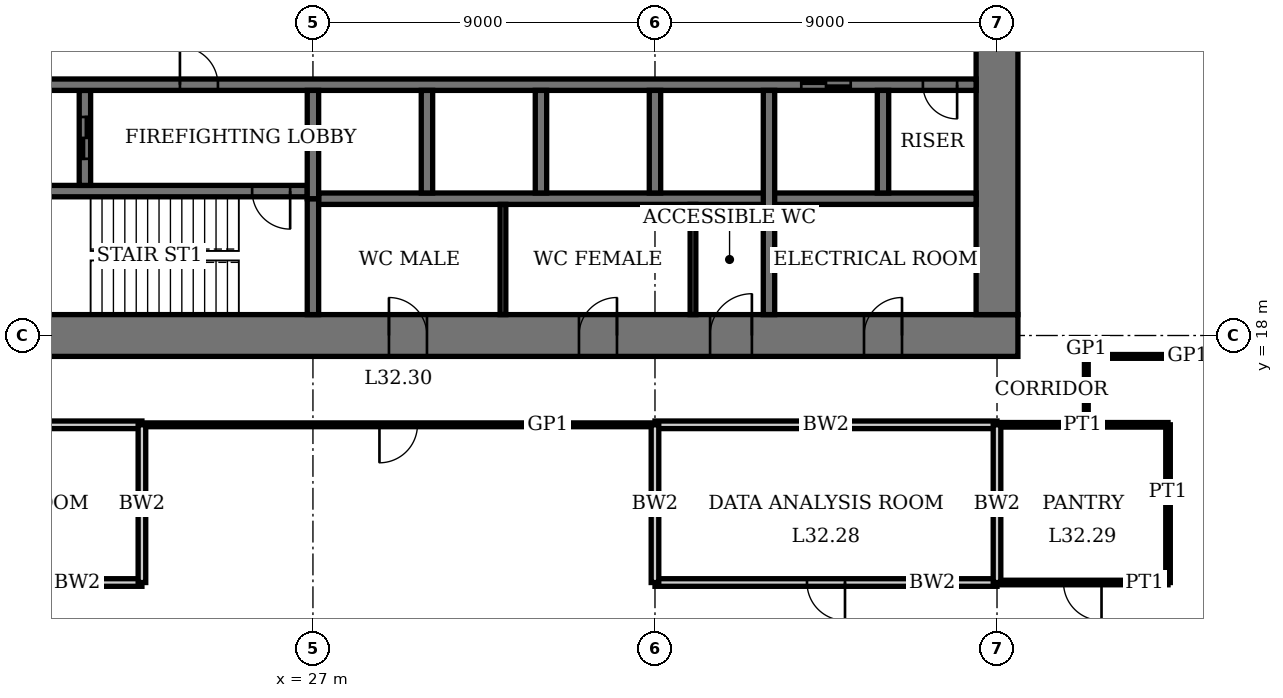
"""IFC4 building model, lengths in metres.
Left out: names, types, materials, properties, quantities, classifications, styles, units other than length and angle.
Written with IfcOpenShell. Run it as: python <this file> out.ifc"""

import sys

from ifc_helpers import new_model, si_unit, direction, frame, frame_2d, origin, place, context, subcontext, project, spatial, rectangle, extrude, element, fill, save


model = new_model("IFC4")
c1 = context("Model", 3, precision=1e-05, world=origin(), true_north=direction((0.0, 1.0)))
c2 = subcontext(c1, "Body", "Model", "MODEL_VIEW")
j1 = project(units=[si_unit("LENGTHUNIT", "METRE"), si_unit("PLANEANGLEUNIT", "RADIAN")], contexts=[c1])
p1 = place(None, origin())
s1 = spatial("IfcSite", under=j1, at=p1, CompositionType="ELEMENT")
p2 = place(p1, origin())
s2 = spatial("IfcBuilding", under=s1, at=p2, CompositionType="ELEMENT")
p3 = place(p2, frame((0.0, 0.0, 133.0)))
s3 = spatial("IfcBuildingStorey", under=s2, at=p3, CompositionType="ELEMENT", Elevation=133.0)
p4 = place(p3, frame((17.45, 18.0, 0.0), z_axis=(0.0, 0.0, 1.0), x_axis=(1.0, 0.0, 0.0)))
e1 = element("IfcWall", 1, at=p4, inside=s3, PredefinedType="SHEAR", context=c2, shape_type="SweptSolid", body=[
    extrude(rectangle(XDim=28.1, YDim=1.1, at=frame_2d((14.05, 0.0))), origin(), (0.0, 0.0, 1.0), 4.0),
])
p5 = place(p4, frame((11.55, 0.0, 0.0)))
e2 = element("IfcOpeningElement", 2, at=p5, cuts=e1, PredefinedType="OPENING", context=c2, shape_type="SweptSolid", body=[
    extrude(rectangle(XDim=1.0, YDim=2.4, at=frame_2d((0.5, 1.2))), frame((0.0, 0.56, 0.0), z_axis=(0.0, -1.0, 0.0), x_axis=(1.0, 0.0, 0.0)), (0.0, 0.0, 1.0), 1.12),
])
p6 = place(p4, frame((16.55, 0.0, 0.0)))
e3 = element("IfcOpeningElement", 3, at=p6, cuts=e1, PredefinedType="OPENING", context=c2, shape_type="SweptSolid", body=[
    extrude(rectangle(XDim=1.0, YDim=2.4, at=frame_2d((0.5, 1.2))), frame((0.0, 0.56, 0.0), z_axis=(0.0, -1.0, 0.0), x_axis=(1.0, 0.0, 0.0)), (0.0, 0.0, 1.0), 1.12),
])
p7 = place(p4, frame((20.0, 0.0, 0.0)))
e4 = element("IfcOpeningElement", 4, at=p7, cuts=e1, PredefinedType="OPENING", context=c2, shape_type="SweptSolid", body=[
    extrude(rectangle(XDim=1.1, YDim=2.4, at=frame_2d((0.55, 1.2))), frame((0.0, 0.56, 0.0), z_axis=(0.0, -1.0, 0.0), x_axis=(1.0, 0.0, 0.0)), (0.0, 0.0, 1.0), 1.12),
])
p8 = place(p4, frame((24.05, 0.0, 0.0)))
e5 = element("IfcOpeningElement", 5, at=p8, cuts=e1, PredefinedType="OPENING", context=c2, shape_type="SweptSolid", body=[
    extrude(rectangle(XDim=1.0, YDim=2.4, at=frame_2d((0.5, 1.2))), frame((0.0, 0.56, 0.0), z_axis=(0.0, -1.0, 0.0), x_axis=(1.0, 0.0, 0.0)), (0.0, 0.0, 1.0), 1.12),
])
p9 = place(p3, frame((45.0, 18.55, 0.0), z_axis=(0.0, 0.0, 1.0), x_axis=(0.0, 1.0, 0.0)))
e6 = element("IfcWall", 6, at=p9, inside=s3, PredefinedType="SHEAR", context=c2, shape_type="SweptSolid", body=[
    extrude(rectangle(XDim=16.9, YDim=1.1, at=frame_2d((8.45, 0.0))), origin(), (0.0, 0.0, 1.0), 4.0),
])
p10 = place(p9, frame((8.45, 0.0, 0.0)))
e7 = element("IfcOpeningElement", 7, at=p10, cuts=e6, PredefinedType="OPENING", context=c2, shape_type="SweptSolid", body=[
    extrude(rectangle(XDim=1.8, YDim=2.4, at=frame_2d((0.9, 1.2))), frame((0.0, 0.56, 0.0), z_axis=(0.0, -1.0, 0.0), x_axis=(1.0, 0.0, 0.0)), (0.0, 0.0, 1.0), 1.12),
])
p11 = place(p3, frame((18.55, 21.8, 0.0), z_axis=(0.0, 0.0, 1.0), x_axis=(1.0, 0.0, 0.0)))
e8 = element("IfcWall", 8, at=p11, inside=s3, PredefinedType="SHEAR", context=c2, shape_type="SweptSolid", body=[
    extrude(rectangle(XDim=8.3, YDim=0.3, at=frame_2d((4.15, 0.0))), origin(), (0.0, 0.0, 1.0), 4.0),
])
p12 = place(p11, frame((6.85, 0.0, 0.0)))
e9 = element("IfcOpeningElement", 9, at=p12, cuts=e8, PredefinedType="OPENING", context=c2, shape_type="SweptSolid", body=[
    extrude(rectangle(XDim=1.0, YDim=2.4, at=frame_2d((0.5, 1.2))), frame((0.0, 0.16, 0.0), z_axis=(0.0, -1.0, 0.0), x_axis=(1.0, 0.0, 0.0)), (0.0, 0.0, 1.0), 0.32),
])
p13 = place(p3, frame((27.0, 18.55, 0.0), z_axis=(0.0, 0.0, 1.0), x_axis=(0.0, 1.0, 0.0)))
e10 = element("IfcWall", 10, at=p13, inside=s3, PredefinedType="SHEAR", context=c2, shape_type="SweptSolid", body=[
    extrude(rectangle(XDim=3.05, YDim=0.3, at=frame_2d((1.525, 0.0))), origin(), (0.0, 0.0, 1.0), 4.0),
])
p14 = place(p3, frame((21.0, 21.95, 0.0), z_axis=(0.0, 0.0, 1.0), x_axis=(0.0, 1.0, 0.0)))
e11 = element("IfcWall", 11, at=p14, inside=s3, PredefinedType="SHEAR", context=c2, shape_type="SweptSolid", body=[
    extrude(rectangle(XDim=2.5, YDim=0.3, at=frame_2d((1.25, 0.0))), origin(), (0.0, 0.0, 1.0), 4.0),
])
p15 = place(p14, frame((0.7, 0.0, 0.0)))
e12 = element("IfcOpeningElement", 12, at=p15, cuts=e11, PredefinedType="OPENING", context=c2, shape_type="SweptSolid", body=[
    extrude(rectangle(XDim=1.1, YDim=2.4, at=frame_2d((0.55, 1.2))), frame((0.0, 0.16, 0.0), z_axis=(0.0, -1.0, 0.0), x_axis=(1.0, 0.0, 0.0)), (0.0, 0.0, 1.0), 0.32),
])
p16 = place(p3, frame((18.55, 24.6, 0.0), z_axis=(0.0, 0.0, 1.0), x_axis=(1.0, 0.0, 0.0)))
e13 = element("IfcWall", 13, at=p16, inside=s3, PredefinedType="SHEAR", context=c2, shape_type="SweptSolid", body=[
    extrude(rectangle(XDim=25.9, YDim=0.3, at=frame_2d((12.95, 0.0))), origin(), (0.0, 0.0, 1.0), 4.0),
])
p17 = place(p16, frame((4.95, 0.0, 0.0)))
e14 = element("IfcOpeningElement", 14, at=p17, cuts=e13, PredefinedType="OPENING", context=c2, shape_type="SweptSolid", body=[
    extrude(rectangle(XDim=1.0, YDim=2.4, at=frame_2d((0.5, 1.2))), frame((0.0, 0.16, 0.0), z_axis=(0.0, -1.0, 0.0), x_axis=(1.0, 0.0, 0.0)), (0.0, 0.0, 1.0), 0.32),
])
p18 = place(p16, frame((24.5, 0.0, 0.0)))
e15 = element("IfcOpeningElement", 15, at=p18, cuts=e13, PredefinedType="OPENING", context=c2, shape_type="SweptSolid", body=[
    extrude(rectangle(XDim=0.9, YDim=2.1, at=frame_2d((0.45, 1.05))), frame((0.0, 0.16, 0.0), z_axis=(0.0, -1.0, 0.0), x_axis=(1.0, 0.0, 0.0)), (0.0, 0.0, 1.0), 0.32),
])
p19 = place(p16, frame((21.3, 0.0, 0.0)))
e16 = element("IfcOpeningElement", 16, at=p19, cuts=e13, PredefinedType="OPENING", context=c2, shape_type="SweptSolid", body=[
    extrude(rectangle(XDim=1.3, YDim=2.4, at=frame_2d((0.65, 1.2))), frame((0.0, 0.16, 0.0), z_axis=(0.0, -1.0, 0.0), x_axis=(1.0, 0.0, 0.0)), (0.0, 0.0, 1.0), 0.32),
])
p20 = place(p3, frame((27.15, 21.6, 0.0), z_axis=(0.0, 0.0, 1.0), x_axis=(1.0, 0.0, 0.0)))
e17 = element("IfcWall", 17, at=p20, inside=s3, PredefinedType="SHEAR", context=c2, shape_type="SweptSolid", body=[
    extrude(rectangle(XDim=17.3, YDim=0.3, at=frame_2d((8.65, 0.0))), origin(), (0.0, 0.0, 1.0), 4.0),
])
for number, where, z_axis, x_axis in (
    (18, (30.0, 21.75, 0.0), (0.0, 0.0, 1.0), (0.0, 1.0, 0.0)),
    (19, (33.0, 21.75, 0.0), (0.0, 0.0, 1.0), (0.0, 1.0, 0.0)),
    (20, (36.0, 21.75, 0.0), (0.0, 0.0, 1.0), (0.0, 1.0, 0.0)),
):
    element("IfcWall", number, at=place(p3, frame(where, z_axis=z_axis, x_axis=x_axis)), inside=s3, PredefinedType="SHEAR", context=c2, shape_type="SweptSolid", body=[
        extrude(rectangle(XDim=2.7, YDim=0.3, at=frame_2d((1.35, 0.0))), origin(), (0.0, 0.0, 1.0), 4.0),
    ])
p21 = place(p3, frame((39.0, 18.55, 0.0), z_axis=(0.0, 0.0, 1.0), x_axis=(0.0, 1.0, 0.0)))
e21 = element("IfcWall", 21, at=p21, inside=s3, PredefinedType="SHEAR", context=c2, shape_type="SweptSolid", body=[
    extrude(rectangle(XDim=5.9, YDim=0.3, at=frame_2d((2.95, 0.0))), origin(), (0.0, 0.0, 1.0), 4.0),
])
p22 = place(p3, frame((42.0, 21.75, 0.0), z_axis=(0.0, 0.0, 1.0), x_axis=(0.0, 1.0, 0.0)))
e22 = element("IfcWall", 22, at=p22, inside=s3, PredefinedType="SHEAR", context=c2, shape_type="SweptSolid", body=[
    extrude(rectangle(XDim=2.7, YDim=0.3, at=frame_2d((1.35, 0.0))), origin(), (0.0, 0.0, 1.0), 4.0),
])
p23 = place(p3, frame((27.0, 21.6, 0.0), z_axis=(0.0, 0.0, 1.0), x_axis=(0.0, 1.0, 0.0)))
e23 = element("IfcWall", 23, at=p23, inside=s3, PredefinedType="SHEAR", context=c2, shape_type="SweptSolid", body=[
    extrude(rectangle(XDim=2.85, YDim=0.3, at=frame_2d((1.425, 0.0))), origin(), (0.0, 0.0, 1.0), 4.0),
])
p24 = place(p3, frame((13.5, 11.5, 0.0), z_axis=(0.0, 0.0, 1.0), x_axis=(1.0, 0.0, 0.0)))
e24 = element("IfcWall", 24, at=p24, inside=s3, PredefinedType="SOLIDWALL", context=c2, shape_type="SweptSolid", body=[
    extrude(rectangle(XDim=9.0, YDim=0.2, at=frame_2d((4.5, 0.0))), origin(), (0.0, 0.0, 1.0), 3.75),
])
p25 = place(p24, frame((4.0, 0.0, 0.0)))
e25 = element("IfcOpeningElement", 25, at=p25, cuts=e24, PredefinedType="OPENING", context=c2, shape_type="SweptSolid", body=[
    extrude(rectangle(XDim=1.0, YDim=2.4, at=frame_2d((0.5, 1.2))), frame((0.0, 0.11, 0.0), z_axis=(0.0, -1.0, 0.0), x_axis=(1.0, 0.0, 0.0)), (0.0, 0.0, 1.0), 0.22),
])
p26 = place(p3, frame((36.0, 11.5, 0.0), z_axis=(0.0, 0.0, 1.0), x_axis=(1.0, 0.0, 0.0)))
e26 = element("IfcWall", 26, at=p26, inside=s3, PredefinedType="SOLIDWALL", context=c2, shape_type="SweptSolid", body=[
    extrude(rectangle(XDim=9.0, YDim=0.2, at=frame_2d((4.5, 0.0))), origin(), (0.0, 0.0, 1.0), 3.75),
])
p27 = place(p26, frame((4.0, 0.0, 0.0)))
e27 = element("IfcOpeningElement", 27, at=p27, cuts=e26, PredefinedType="OPENING", context=c2, shape_type="SweptSolid", body=[
    extrude(rectangle(XDim=1.0, YDim=2.4, at=frame_2d((0.5, 1.2))), frame((0.0, 0.11, 0.0), z_axis=(0.0, -1.0, 0.0), x_axis=(1.0, 0.0, 0.0)), (0.0, 0.0, 1.0), 0.22),
])
p28 = place(p3, frame((45.0, 11.5, 0.0), z_axis=(0.0, 0.0, 1.0), x_axis=(1.0, 0.0, 0.0)))
e28 = element("IfcWall", 28, at=p28, inside=s3, PredefinedType="PARTITIONING", context=c2, shape_type="SweptSolid", body=[
    extrude(rectangle(XDim=4.5, YDim=0.12, at=frame_2d((2.25, 0.0))), origin(), (0.0, 0.0, 1.0), 3.75),
])
p29 = place(p28, frame((1.75, 0.0, 0.0)))
e29 = element("IfcOpeningElement", 29, at=p29, cuts=e28, PredefinedType="OPENING", context=c2, shape_type="SweptSolid", body=[
    extrude(rectangle(XDim=1.0, YDim=2.4, at=frame_2d((0.5, 1.2))), frame((0.0, 0.07, 0.0), z_axis=(0.0, -1.0, 0.0), x_axis=(1.0, 0.0, 0.0)), (0.0, 0.0, 1.0), 0.14),
])
for number, where, z_axis, x_axis in (
    (30, (13.5, 15.65, 0.0), (0.0, 0.0, 1.0), (1.0, 0.0, 0.0)),
    (31, (36.0, 15.65, 0.0), (0.0, 0.0, 1.0), (1.0, 0.0, 0.0)),
):
    element("IfcWall", number, at=place(p3, frame(where, z_axis=z_axis, x_axis=x_axis)), inside=s3, PredefinedType="SOLIDWALL", context=c2, shape_type="SweptSolid", body=[
        extrude(rectangle(XDim=9.0, YDim=0.2, at=frame_2d((4.5, 0.0))), origin(), (0.0, 0.0, 1.0), 3.75),
    ])
p30 = place(p3, frame((45.0, 15.65, 0.0), z_axis=(0.0, 0.0, 1.0), x_axis=(1.0, 0.0, 0.0)))
e32 = element("IfcWall", 32, at=p30, inside=s3, PredefinedType="PARTITIONING", context=c2, shape_type="SweptSolid", body=[
    extrude(rectangle(XDim=4.5, YDim=0.12, at=frame_2d((2.25, 0.0))), origin(), (0.0, 0.0, 1.0), 3.75),
])
p31 = place(p3, frame((22.5, 15.65, 0.0), z_axis=(0.0, 0.0, 1.0), x_axis=(1.0, 0.0, 0.0)))
e33 = element("IfcWall", 33, at=p31, inside=s3, PredefinedType="PARTITIONING", context=c2, shape_type="SweptSolid", body=[
    extrude(rectangle(XDim=13.5, YDim=0.1, at=frame_2d((6.75, 0.0))), origin(), (0.0, 0.0, 1.0), 3.75),
])
p32 = place(p31, frame((6.25, 0.0, 0.0)))
e34 = element("IfcOpeningElement", 34, at=p32, cuts=e33, PredefinedType="OPENING", context=c2, shape_type="SweptSolid", body=[
    extrude(rectangle(XDim=1.0, YDim=2.4, at=frame_2d((0.5, 1.2))), frame((0.0, 0.06, 0.0), z_axis=(0.0, -1.0, 0.0), x_axis=(1.0, 0.0, 0.0)), (0.0, 0.0, 1.0), 0.12),
])
p33 = place(p3, frame((47.35, 17.45, 0.0), z_axis=(0.0, 0.0, 1.0), x_axis=(1.0, 0.0, 0.0)))
e35 = element("IfcWall", 35, at=p33, inside=s3, PredefinedType="PARTITIONING", context=c2, shape_type="SweptSolid", body=[
    extrude(rectangle(XDim=5.75, YDim=0.1, at=frame_2d((2.875, 0.0))), origin(), (0.0, 0.0, 1.0), 3.75),
])
p34 = place(p3, frame((22.5, 11.5, 0.0), z_axis=(0.0, 0.0, 1.0), x_axis=(0.0, 1.0, 0.0)))
e36 = element("IfcWall", 36, at=p34, inside=s3, PredefinedType="SOLIDWALL", context=c2, shape_type="SweptSolid", body=[
    extrude(rectangle(XDim=4.15, YDim=0.2, at=frame_2d((2.075, 0.0))), origin(), (0.0, 0.0, 1.0), 3.75),
])
for number, where, z_axis, x_axis in (
    (37, (36.0, 11.5, 0.0), (0.0, 0.0, 1.0), (0.0, 1.0, 0.0)),
    (38, (45.0, 11.5, 0.0), (0.0, 0.0, 1.0), (0.0, 1.0, 0.0)),
):
    element("IfcWall", number, at=place(p3, frame(where, z_axis=z_axis, x_axis=x_axis)), inside=s3, PredefinedType="SOLIDWALL", context=c2, shape_type="SweptSolid", body=[
        extrude(rectangle(XDim=4.15, YDim=0.2, at=frame_2d((2.075, 0.0))), origin(), (0.0, 0.0, 1.0), 3.05),
    ])
p35 = place(p3, frame((47.35, 15.65, 0.0), z_axis=(0.0, 0.0, 1.0), x_axis=(0.0, 1.0, 0.0)))
e39 = element("IfcWall", 39, at=p35, inside=s3, PredefinedType="PARTITIONING", context=c2, shape_type="SweptSolid", body=[
    extrude(rectangle(XDim=1.8, YDim=0.1, at=frame_2d((0.9, 0.0))), origin(), (0.0, 0.0, 1.0), 3.75),
])
p36 = place(p3, frame((49.5, 11.5, 0.0), z_axis=(0.0, 0.0, 1.0), x_axis=(0.0, 1.0, 0.0)))
e40 = element("IfcWall", 40, at=p36, inside=s3, PredefinedType="PARTITIONING", context=c2, shape_type="SweptSolid", body=[
    extrude(rectangle(XDim=4.15, YDim=0.12, at=frame_2d((2.075, 0.0))), origin(), (0.0, 0.0, 1.0), 3.75),
])
for number, where, z_axis, x_axis in (
    (41, (32.0, 18.55, 0.0), (0.0, 0.0, 1.0), (0.0, 1.0, 0.0)),
    (42, (37.0, 18.55, 0.0), (0.0, 0.0, 1.0), (0.0, 1.0, 0.0)),
):
    element("IfcWall", number, at=place(p3, frame(where, z_axis=z_axis, x_axis=x_axis)), inside=s3, PredefinedType="PARTITIONING", context=c2, shape_type="SweptSolid", body=[
        extrude(rectangle(XDim=2.9, YDim=0.15, at=frame_2d((1.45, 0.0))), origin(), (0.0, 0.0, 1.0), 3.75),
    ])
p37 = place(p5, origin())
e43 = element("IfcDoor", 43, at=p37, inside=s3, OperationType="SINGLE_SWING_RIGHT", PredefinedType="DOOR", context=c2, shape_type="SweptSolid", body=[
    extrude(rectangle(XDim=1.0, YDim=2.4, at=frame_2d((0.5, 1.2))), frame((0.0, 0.025, 0.0), z_axis=(0.0, -1.0, 0.0), x_axis=(1.0, 0.0, 0.0)), (0.0, 0.0, 1.0), 0.05),
    extrude(rectangle(XDim=0.04, YDim=2.4, at=frame_2d((0.02, 1.2))), frame((0.0, 0.4, 0.0), z_axis=(0.0, -1.0, 0.0), x_axis=(1.0, 0.0, 0.0)), (0.0, 0.0, 1.0), 0.8),
    extrude(rectangle(XDim=0.04, YDim=2.4, at=frame_2d((0.98, 1.2))), frame((0.0, 0.4, 0.0), z_axis=(0.0, -1.0, 0.0), x_axis=(1.0, 0.0, 0.0)), (0.0, 0.0, 1.0), 0.8),
    extrude(rectangle(XDim=1.0, YDim=0.04, at=frame_2d((0.5, 2.38))), frame((0.0, 0.4, 0.0), z_axis=(0.0, -1.0, 0.0), x_axis=(1.0, 0.0, 0.0)), (0.0, 0.0, 1.0), 0.8),
])
fill(e2, e43)
p38 = place(p6, origin())
e44 = element("IfcDoor", 44, at=p38, inside=s3, OperationType="SINGLE_SWING_LEFT", PredefinedType="DOOR", context=c2, shape_type="SweptSolid", body=[
    extrude(rectangle(XDim=1.0, YDim=2.4, at=frame_2d((0.5, 1.2))), frame((0.0, 0.025, 0.0), z_axis=(0.0, -1.0, 0.0), x_axis=(1.0, 0.0, 0.0)), (0.0, 0.0, 1.0), 0.05),
    extrude(rectangle(XDim=0.04, YDim=2.4, at=frame_2d((0.02, 1.2))), frame((0.0, 0.4, 0.0), z_axis=(0.0, -1.0, 0.0), x_axis=(1.0, 0.0, 0.0)), (0.0, 0.0, 1.0), 0.8),
    extrude(rectangle(XDim=0.04, YDim=2.4, at=frame_2d((0.98, 1.2))), frame((0.0, 0.4, 0.0), z_axis=(0.0, -1.0, 0.0), x_axis=(1.0, 0.0, 0.0)), (0.0, 0.0, 1.0), 0.8),
    extrude(rectangle(XDim=1.0, YDim=0.04, at=frame_2d((0.5, 2.38))), frame((0.0, 0.4, 0.0), z_axis=(0.0, -1.0, 0.0), x_axis=(1.0, 0.0, 0.0)), (0.0, 0.0, 1.0), 0.8),
])
fill(e3, e44)
p39 = place(p7, origin())
e45 = element("IfcDoor", 45, at=p39, inside=s3, OperationType="SINGLE_SWING_LEFT", PredefinedType="DOOR", context=c2, shape_type="SweptSolid", body=[
    extrude(rectangle(XDim=1.1, YDim=2.4, at=frame_2d((0.55, 1.2))), frame((0.0, 0.025, 0.0), z_axis=(0.0, -1.0, 0.0), x_axis=(1.0, 0.0, 0.0)), (0.0, 0.0, 1.0), 0.05),
    extrude(rectangle(XDim=0.04, YDim=2.4, at=frame_2d((0.02, 1.2))), frame((0.0, 0.44, 0.0), z_axis=(0.0, -1.0, 0.0), x_axis=(1.0, 0.0, 0.0)), (0.0, 0.0, 1.0), 0.88),
    extrude(rectangle(XDim=0.04, YDim=2.4, at=frame_2d((1.08, 1.2))), frame((0.0, 0.44, 0.0), z_axis=(0.0, -1.0, 0.0), x_axis=(1.0, 0.0, 0.0)), (0.0, 0.0, 1.0), 0.88),
    extrude(rectangle(XDim=1.1, YDim=0.04, at=frame_2d((0.55, 2.38))), frame((0.0, 0.44, 0.0), z_axis=(0.0, -1.0, 0.0), x_axis=(1.0, 0.0, 0.0)), (0.0, 0.0, 1.0), 0.88),
])
fill(e4, e45)
p40 = place(p8, origin())
e46 = element("IfcDoor", 46, at=p40, inside=s3, OperationType="SINGLE_SWING_LEFT", PredefinedType="DOOR", context=c2, shape_type="SweptSolid", body=[
    extrude(rectangle(XDim=1.0, YDim=2.4, at=frame_2d((0.5, 1.2))), frame((0.0, 0.025, 0.0), z_axis=(0.0, -1.0, 0.0), x_axis=(1.0, 0.0, 0.0)), (0.0, 0.0, 1.0), 0.05),
    extrude(rectangle(XDim=0.04, YDim=2.4, at=frame_2d((0.02, 1.2))), frame((0.0, 0.4, 0.0), z_axis=(0.0, -1.0, 0.0), x_axis=(1.0, 0.0, 0.0)), (0.0, 0.0, 1.0), 0.8),
    extrude(rectangle(XDim=0.04, YDim=2.4, at=frame_2d((0.98, 1.2))), frame((0.0, 0.4, 0.0), z_axis=(0.0, -1.0, 0.0), x_axis=(1.0, 0.0, 0.0)), (0.0, 0.0, 1.0), 0.8),
    extrude(rectangle(XDim=1.0, YDim=0.04, at=frame_2d((0.5, 2.38))), frame((0.0, 0.4, 0.0), z_axis=(0.0, -1.0, 0.0), x_axis=(1.0, 0.0, 0.0)), (0.0, 0.0, 1.0), 0.8),
])
fill(e5, e46)
p41 = place(p12, origin())
e47 = element("IfcDoor", 47, at=p41, inside=s3, OperationType="SINGLE_SWING_RIGHT", PredefinedType="DOOR", context=c2, shape_type="SweptSolid", body=[
    extrude(rectangle(XDim=1.0, YDim=2.4, at=frame_2d((0.5, 1.2))), frame((0.0, 0.03, 0.0), z_axis=(0.0, -1.0, 0.0), x_axis=(1.0, 0.0, 0.0)), (0.0, 0.0, 1.0), 0.06),
])
fill(e9, e47)
p42 = place(p17, origin())
e48 = element("IfcDoor", 48, at=p42, inside=s3, OperationType="SINGLE_SWING_RIGHT", PredefinedType="DOOR", context=c2, shape_type="SweptSolid", body=[
    extrude(rectangle(XDim=1.0, YDim=2.4, at=frame_2d((0.5, 1.2))), frame((0.0, 0.03, 0.0), z_axis=(0.0, -1.0, 0.0), x_axis=(1.0, 0.0, 0.0)), (0.0, 0.0, 1.0), 0.06),
])
fill(e14, e48)
p43 = place(p18, origin())
e49 = element("IfcDoor", 49, at=p43, inside=s3, OperationType="SINGLE_SWING_RIGHT", PredefinedType="DOOR", context=c2, shape_type="SweptSolid", body=[
    extrude(rectangle(XDim=0.9, YDim=2.1, at=frame_2d((0.45, 1.05))), frame((0.0, 0.03, 0.0), z_axis=(0.0, -1.0, 0.0), x_axis=(1.0, 0.0, 0.0)), (0.0, 0.0, 1.0), 0.06),
])
fill(e15, e49)
p44 = place(p27, origin())
e50 = element("IfcDoor", 50, at=p44, inside=s3, OperationType="SINGLE_SWING_RIGHT", PredefinedType="DOOR", context=c2, shape_type="SweptSolid", body=[
    extrude(rectangle(XDim=1.0, YDim=2.4, at=frame_2d((0.5, 1.2))), frame((0.0, 0.035, 0.0), z_axis=(0.0, -1.0, 0.0), x_axis=(1.0, 0.0, 0.0)), (0.0, 0.0, 1.0), 0.07),
])
fill(e27, e50)
p45 = place(p29, origin())
e51 = element("IfcDoor", 51, at=p45, inside=s3, OperationType="SINGLE_SWING_RIGHT", PredefinedType="DOOR", context=c2, shape_type="SweptSolid", body=[
    extrude(rectangle(XDim=1.0, YDim=2.4, at=frame_2d((0.5, 1.2))), frame((0.0, 0.025, 0.0), z_axis=(0.0, -1.0, 0.0), x_axis=(1.0, 0.0, 0.0)), (0.0, 0.0, 1.0), 0.05),
])
fill(e29, e51)
p46 = place(p32, origin())
e52 = element("IfcDoor", 52, at=p46, inside=s3, OperationType="SINGLE_SWING_LEFT", PredefinedType="DOOR", context=c2, shape_type="SweptSolid", body=[
    extrude(rectangle(XDim=1.0, YDim=2.4, at=frame_2d((0.5, 1.2))), frame((0.0, 0.02, 0.0), z_axis=(0.0, -1.0, 0.0), x_axis=(1.0, 0.0, 0.0)), (0.0, 0.0, 1.0), 0.04),
])
fill(e34, e52)
p47 = place(p19, origin())
e53 = element("IfcDoor", 53, at=p47, inside=s3, OperationType="DOUBLE_DOOR_SLIDING", PredefinedType="DOOR", context=c2, shape_type="SweptSolid", body=[
    extrude(rectangle(XDim=1.3, YDim=2.4, at=frame_2d((0.65, 1.2))), frame((0.0, 0.02, 0.0), z_axis=(0.0, -1.0, 0.0), x_axis=(1.0, 0.0, 0.0)), (0.0, 0.0, 1.0), 0.04),
])
fill(e16, e53)
p48 = place(p15, origin())
e54 = element("IfcDoor", 54, at=p48, inside=s3, OperationType="DOUBLE_DOOR_SLIDING", PredefinedType="DOOR", context=c2, shape_type="SweptSolid", body=[
    extrude(rectangle(XDim=1.1, YDim=2.4, at=frame_2d((0.55, 1.2))), frame((0.0, 0.03, 0.0), z_axis=(0.0, -1.0, 0.0), x_axis=(1.0, 0.0, 0.0)), (0.0, 0.0, 1.0), 0.06),
])
fill(e12, e54)
save(model, sys.argv[1])
